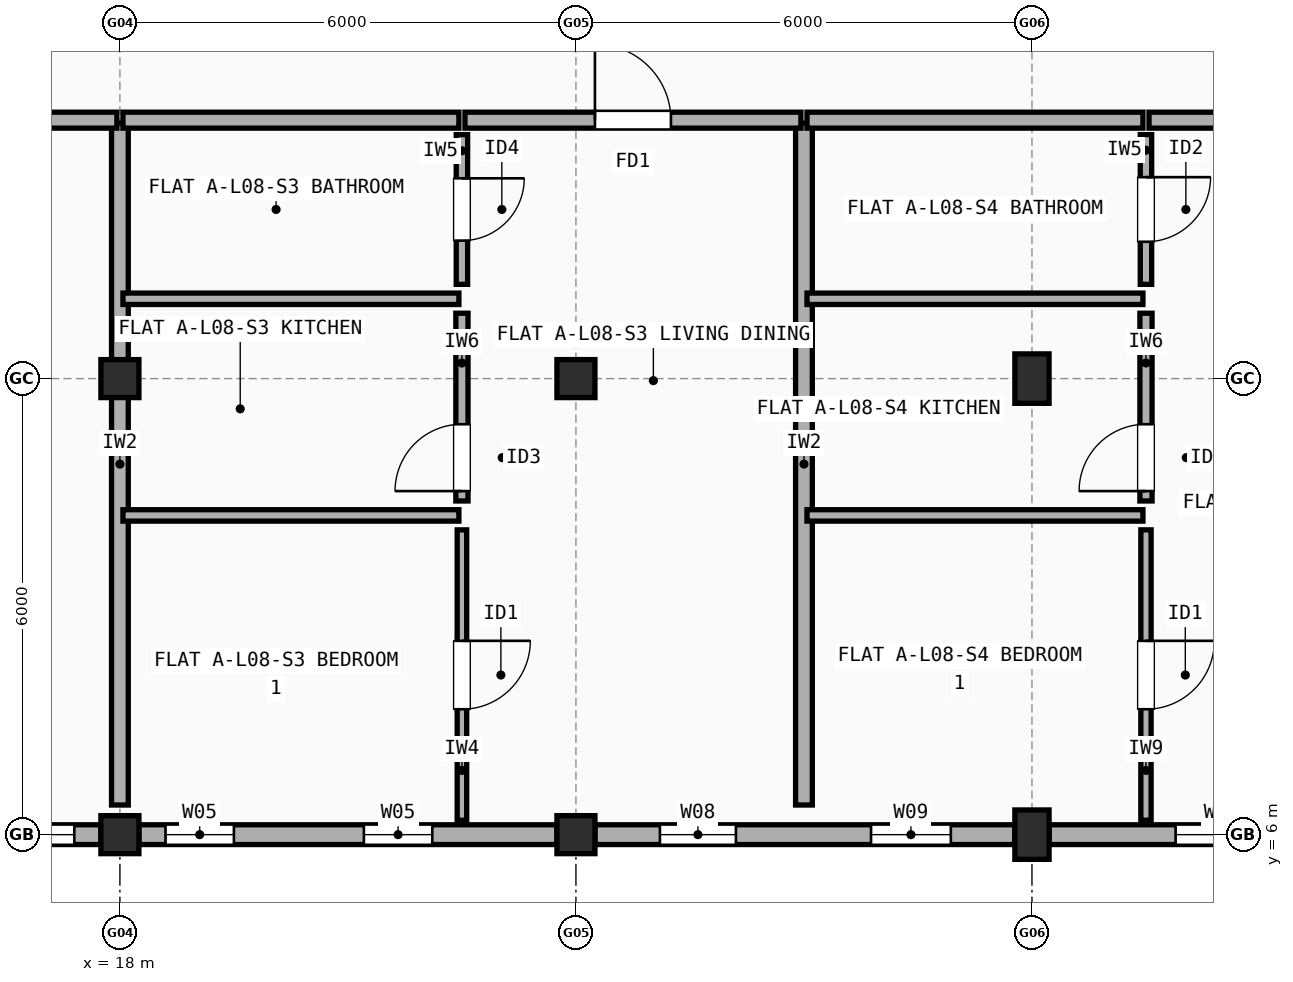
"""IFC4 building model, lengths in metres.
Left out: names, types, materials, properties, quantities, classifications, styles, units other than length and angle.
Written with IfcOpenShell. Run it as: python <this file> out.ifc"""

import sys

from ifc_helpers import new_model, si_unit, direction, frame, frame_2d, origin, origin_2d, place, context, subcontext, project, spatial, rectangle, extrude, element, fill, save


model = new_model("IFC4")
c1 = context("Model", 3, precision=1e-05, world=origin(), true_north=direction((0.0, 1.0)))
c2 = subcontext(c1, "Body", "Model", "MODEL_VIEW")
j1 = project(units=[si_unit("LENGTHUNIT", "METRE"), si_unit("PLANEANGLEUNIT", "RADIAN")], contexts=[c1])
p1 = place(None, origin())
s1 = spatial("IfcSite", under=j1, at=p1, CompositionType="ELEMENT")
p2 = place(p1, origin())
s2 = spatial("IfcBuilding", under=s1, at=p2, CompositionType="ELEMENT")
p3 = place(p2, frame((0.0, 0.0, 26.9)))
s3 = spatial("IfcBuildingStorey", under=s2, at=p3, CompositionType="ELEMENT", Elevation=26.9)
for number, where, z_axis, x_axis in (
    (1, (18.0, 6.0, 0.0), (0.0, 0.0, 1.0), (1.0, 0.0, 0.0)),
    (2, (18.0, 12.0, 0.0), (0.0, 0.0, 1.0), (1.0, 0.0, 0.0)),
    (3, (24.0, 6.0, 0.0), (0.0, 0.0, 1.0), (1.0, 0.0, 0.0)),
    (4, (24.0, 12.0, 0.0), (0.0, 0.0, 1.0), (1.0, 0.0, 0.0)),
):
    element("IfcColumn", number, at=place(p3, frame(where, z_axis=z_axis, x_axis=x_axis)), inside=s3, PredefinedType="COLUMN", context=c2, shape_type="SweptSolid", body=[
        extrude(rectangle(XDim=0.5, YDim=0.5, at=origin_2d()), origin(), (0.0, 0.0, 1.0), 2.98),
    ])
for number, where, z_axis, x_axis in (
    (5, (30.0, 6.0, 0.0), (0.0, 0.0, 1.0), (1.0, 0.0, 0.0)),
    (6, (30.0, 12.0, 0.0), (0.0, 0.0, 1.0), (1.0, 0.0, 0.0)),
):
    element("IfcColumn", number, at=place(p3, frame(where, z_axis=z_axis, x_axis=x_axis)), inside=s3, PredefinedType="COLUMN", context=c2, shape_type="SweptSolid", body=[
        extrude(rectangle(XDim=0.45, YDim=0.65, at=origin_2d()), origin(), (0.0, 0.0, 1.0), 2.98),
    ])
p4 = place(p3, frame((12.25, 6.0, 0.0), z_axis=(0.0, 0.0, 1.0), x_axis=(1.0, 0.0, 0.0)))
e7 = element("IfcWall", 7, at=p4, inside=s3, PredefinedType="STANDARD", context=c2, shape_type="SweptSolid", body=[
    extrude(rectangle(XDim=5.5, YDim=0.26, at=frame_2d((2.75, 0.0))), origin(), (0.0, 0.0, 1.0), 2.462),
])
p5 = place(p4, frame((0.35, 0.0, 0.9)))
e8 = element("IfcOpeningElement", 8, at=p5, cuts=e7, PredefinedType="OPENING", context=c2, shape_type="SweptSolid", body=[
    extrude(rectangle(XDim=1.2, YDim=1.35, at=frame_2d((0.6, 0.675))), frame((0.0, 0.14, 0.0), z_axis=(0.0, -1.0, 0.0), x_axis=(1.0, 0.0, 0.0)), (0.0, 0.0, 1.0), 0.28),
])
p6 = place(p4, frame((3.95, 0.0, 0.9)))
e9 = element("IfcOpeningElement", 9, at=p6, cuts=e7, PredefinedType="OPENING", context=c2, shape_type="SweptSolid", body=[
    extrude(rectangle(XDim=1.2, YDim=1.35, at=frame_2d((0.6, 0.675))), frame((0.0, 0.14, 0.0), z_axis=(0.0, -1.0, 0.0), x_axis=(1.0, 0.0, 0.0)), (0.0, 0.0, 1.0), 0.28),
])
p7 = place(p3, frame((18.25, 6.0, 0.0), z_axis=(0.0, 0.0, 1.0), x_axis=(1.0, 0.0, 0.0)))
e10 = element("IfcWall", 10, at=p7, inside=s3, PredefinedType="STANDARD", context=c2, shape_type="SweptSolid", body=[
    extrude(rectangle(XDim=5.5, YDim=0.26, at=frame_2d((2.75, 0.0))), origin(), (0.0, 0.0, 1.0), 2.462),
])
p8 = place(p7, frame((0.35, 0.0, 0.9)))
e11 = element("IfcOpeningElement", 11, at=p8, cuts=e10, PredefinedType="OPENING", context=c2, shape_type="SweptSolid", body=[
    extrude(rectangle(XDim=0.9, YDim=1.4, at=frame_2d((0.45, 0.7))), frame((0.0, 0.14, 0.0), z_axis=(0.0, -1.0, 0.0), x_axis=(1.0, 0.0, 0.0)), (0.0, 0.0, 1.0), 0.28),
])
p9 = place(p7, frame((2.96, 0.0, 0.9)))
e12 = element("IfcOpeningElement", 12, at=p9, cuts=e10, PredefinedType="OPENING", context=c2, shape_type="SweptSolid", body=[
    extrude(rectangle(XDim=0.9, YDim=1.4, at=frame_2d((0.45, 0.7))), frame((0.0, 0.14, 0.0), z_axis=(0.0, -1.0, 0.0), x_axis=(1.0, 0.0, 0.0)), (0.0, 0.0, 1.0), 0.28),
])
p10 = place(p3, frame((24.25, 6.0, 0.0), z_axis=(0.0, 0.0, 1.0), x_axis=(1.0, 0.0, 0.0)))
e13 = element("IfcWall", 13, at=p10, inside=s3, PredefinedType="STANDARD", context=c2, shape_type="SweptSolid", body=[
    extrude(rectangle(XDim=5.525, YDim=0.26, at=frame_2d((2.762, 0.0))), origin(), (0.0, 0.0, 1.0), 2.462),
])
p11 = place(p10, frame((0.855, 0.0, 0.9)))
e14 = element("IfcOpeningElement", 14, at=p11, cuts=e13, PredefinedType="OPENING", context=c2, shape_type="SweptSolid", body=[
    extrude(rectangle(XDim=1.0, YDim=1.4, at=frame_2d((0.5, 0.7))), frame((0.0, 0.14, 0.0), z_axis=(0.0, -1.0, 0.0), x_axis=(1.0, 0.0, 0.0)), (0.0, 0.0, 1.0), 0.28),
])
p12 = place(p10, frame((3.633, 0.0, 0.9)))
e15 = element("IfcOpeningElement", 15, at=p12, cuts=e13, PredefinedType="OPENING", context=c2, shape_type="SweptSolid", body=[
    extrude(rectangle(XDim=1.05, YDim=1.35, at=frame_2d((0.525, 0.675))), frame((0.0, 0.14, 0.0), z_axis=(0.0, -1.0, 0.0), x_axis=(1.0, 0.0, 0.0)), (0.0, 0.0, 1.0), 0.28),
])
p13 = place(p3, frame((30.225, 6.0, 0.0), z_axis=(0.0, 0.0, 1.0), x_axis=(1.0, 0.0, 0.0)))
e16 = element("IfcWall", 16, at=p13, inside=s3, PredefinedType="STANDARD", context=c2, shape_type="SweptSolid", body=[
    extrude(rectangle(XDim=5.55, YDim=0.26, at=frame_2d((2.775, 0.0))), origin(), (0.0, 0.0, 1.0), 2.462),
])
p14 = place(p13, frame((1.665, 0.0, 0.9)))
e17 = element("IfcOpeningElement", 17, at=p14, cuts=e16, PredefinedType="OPENING", context=c2, shape_type="SweptSolid", body=[
    extrude(rectangle(XDim=1.2, YDim=1.35, at=frame_2d((0.6, 0.675))), frame((0.0, 0.14, 0.0), z_axis=(0.0, -1.0, 0.0), x_axis=(1.0, 0.0, 0.0)), (0.0, 0.0, 1.0), 0.28),
])
p15 = place(p13, frame((4.0, 0.0, 0.9)))
e18 = element("IfcOpeningElement", 18, at=p15, cuts=e16, PredefinedType="OPENING", context=c2, shape_type="SweptSolid", body=[
    extrude(rectangle(XDim=1.2, YDim=1.35, at=frame_2d((0.6, 0.675))), frame((0.0, 0.14, 0.0), z_axis=(0.0, -1.0, 0.0), x_axis=(1.0, 0.0, 0.0)), (0.0, 0.0, 1.0), 0.28),
])
p16 = place(p3, frame((18.0, 6.39, 0.0), z_axis=(0.0, 0.0, 1.0), x_axis=(0.0, 1.0, 0.0)))
e19 = element("IfcWall", 19, at=p16, inside=s3, PredefinedType="SOLIDWALL", context=c2, shape_type="SweptSolid", body=[
    extrude(rectangle(XDim=8.97, YDim=0.22, at=frame_2d((4.485, 0.0))), origin(), (0.0, 0.0, 1.0), 2.508),
])
p17 = place(p3, frame((12.04, 15.4, 0.0), z_axis=(0.0, 0.0, 1.0), x_axis=(1.0, 0.0, 0.0)))
e20 = element("IfcWall", 20, at=p17, inside=s3, PredefinedType="SOLIDWALL", context=c2, shape_type="SweptSolid", body=[
    extrude(rectangle(XDim=5.92, YDim=0.21, at=frame_2d((2.96, 0.0))), origin(), (0.0, 0.0, 1.0), 2.508),
])
p18 = place(p17, frame((2.435, 0.0, 0.0)))
e21 = element("IfcOpeningElement", 21, at=p18, cuts=e20, PredefinedType="OPENING", context=c2, shape_type="SweptSolid", body=[
    extrude(rectangle(XDim=1.05, YDim=2.15, at=frame_2d((0.525, 1.075))), frame((0.0, 0.115, 0.0), z_axis=(0.0, -1.0, 0.0), x_axis=(1.0, 0.0, 0.0)), (0.0, 0.0, 1.0), 0.23),
])
p19 = place(p3, frame((27.0, 6.39, 0.0), z_axis=(0.0, 0.0, 1.0), x_axis=(0.0, 1.0, 0.0)))
e22 = element("IfcWall", 22, at=p19, inside=s3, PredefinedType="SOLIDWALL", context=c2, shape_type="SweptSolid", body=[
    extrude(rectangle(XDim=8.97, YDim=0.22, at=frame_2d((4.485, 0.0))), origin(), (0.0, 0.0, 1.0), 2.408),
])
p20 = place(p3, frame((18.04, 15.4, 0.0), z_axis=(0.0, 0.0, 1.0), x_axis=(1.0, 0.0, 0.0)))
e23 = element("IfcWall", 23, at=p20, inside=s3, PredefinedType="SOLIDWALL", context=c2, shape_type="SweptSolid", body=[
    extrude(rectangle(XDim=4.42, YDim=0.21, at=frame_2d((2.21, 0.0))), origin(), (0.0, 0.0, 1.0), 2.508),
])
p21 = place(p3, frame((22.54, 15.4, 0.0), z_axis=(0.0, 0.0, 1.0), x_axis=(1.0, 0.0, 0.0)))
e24 = element("IfcWall", 24, at=p21, inside=s3, PredefinedType="SOLIDWALL", context=c2, shape_type="SweptSolid", body=[
    extrude(rectangle(XDim=4.42, YDim=0.21, at=frame_2d((2.21, 0.0))), origin(), (0.0, 0.0, 1.0), 2.508),
])
p22 = place(p21, frame((1.71, 0.0, 0.0)))
e25 = element("IfcOpeningElement", 25, at=p22, cuts=e24, PredefinedType="OPENING", context=c2, shape_type="SweptSolid", body=[
    extrude(rectangle(XDim=1.0, YDim=2.15, at=frame_2d((0.5, 1.075))), frame((0.0, 0.115, 0.0), z_axis=(0.0, -1.0, 0.0), x_axis=(1.0, 0.0, 0.0)), (0.0, 0.0, 1.0), 0.23),
])
p23 = place(p3, frame((22.5, 6.19, 0.0), z_axis=(0.0, 0.0, 1.0), x_axis=(0.0, 1.0, 0.0)))
e26 = element("IfcWall", 26, at=p23, inside=s3, PredefinedType="PARTITIONING", context=c2, shape_type="SweptSolid", body=[
    extrude(rectangle(XDim=3.82, YDim=0.125, at=frame_2d((1.91, 0.0))), origin(), (0.0, 0.0, 1.0), 2.98),
])
p24 = place(p23, frame((1.46, 0.0, 0.0)))
e27 = element("IfcOpeningElement", 27, at=p24, cuts=e26, PredefinedType="OPENING", context=c2, shape_type="SweptSolid", body=[
    extrude(rectangle(XDim=0.9, YDim=2.1, at=frame_2d((0.45, 1.05))), frame((0.0, 0.073, 0.0), z_axis=(0.0, -1.0, 0.0), x_axis=(1.0, 0.0, 0.0)), (0.0, 0.0, 1.0), 0.145),
])
p25 = place(p3, frame((22.5, 10.39, 0.0), z_axis=(0.0, 0.0, 1.0), x_axis=(0.0, 1.0, 0.0)))
e28 = element("IfcWall", 28, at=p25, inside=s3, PredefinedType="PLUMBINGWALL", context=c2, shape_type="SweptSolid", body=[
    extrude(rectangle(XDim=2.47, YDim=0.16, at=frame_2d((1.235, 0.0))), origin(), (0.0, 0.0, 1.0), 2.508),
])
p26 = place(p25, frame((0.13, 0.0, 0.0)))
e29 = element("IfcOpeningElement", 29, at=p26, cuts=e28, PredefinedType="OPENING", context=c2, shape_type="SweptSolid", body=[
    extrude(rectangle(XDim=0.88, YDim=2.1, at=frame_2d((0.44, 1.05))), frame((0.0, 0.09, 0.0), z_axis=(0.0, -1.0, 0.0), x_axis=(1.0, 0.0, 0.0)), (0.0, 0.0, 1.0), 0.18),
])
p27 = place(p3, frame((22.5, 13.24, 0.0), z_axis=(0.0, 0.0, 1.0), x_axis=(0.0, 1.0, 0.0)))
e30 = element("IfcWall", 30, at=p27, inside=s3, PredefinedType="PARTITIONING", context=c2, shape_type="SweptSolid", body=[
    extrude(rectangle(XDim=1.97, YDim=0.15, at=frame_2d((0.985, 0.0))), origin(), (0.0, 0.0, 1.0), 2.98),
])
p28 = place(p27, frame((0.575, 0.0, 0.0)))
e31 = element("IfcOpeningElement", 31, at=p28, cuts=e30, PredefinedType="OPENING", context=c2, shape_type="SweptSolid", body=[
    extrude(rectangle(XDim=0.82, YDim=2.08, at=frame_2d((0.41, 1.04))), frame((0.0, 0.085, 0.0), z_axis=(0.0, -1.0, 0.0), x_axis=(1.0, 0.0, 0.0)), (0.0, 0.0, 1.0), 0.17),
])
p29 = place(p3, frame((18.04, 10.2, 0.0), z_axis=(0.0, 0.0, 1.0), x_axis=(1.0, 0.0, 0.0)))
e32 = element("IfcWall", 32, at=p29, inside=s3, PredefinedType="PARTITIONING", context=c2, shape_type="SweptSolid", body=[
    extrude(rectangle(XDim=4.42, YDim=0.15, at=frame_2d((2.21, 0.0))), origin(), (0.0, 0.0, 1.0), 2.548),
])
p30 = place(p3, frame((18.04, 13.05, 0.0), z_axis=(0.0, 0.0, 1.0), x_axis=(1.0, 0.0, 0.0)))
e33 = element("IfcWall", 33, at=p30, inside=s3, PredefinedType="PARTITIONING", context=c2, shape_type="SweptSolid", body=[
    extrude(rectangle(XDim=4.42, YDim=0.15, at=frame_2d((2.21, 0.0))), origin(), (0.0, 0.0, 1.0), 2.508),
])
p31 = place(p3, frame((27.04, 15.4, 0.0), z_axis=(0.0, 0.0, 1.0), x_axis=(1.0, 0.0, 0.0)))
e34 = element("IfcWall", 34, at=p31, inside=s3, PredefinedType="SOLIDWALL", context=c2, shape_type="SweptSolid", body=[
    extrude(rectangle(XDim=4.42, YDim=0.21, at=frame_2d((2.21, 0.0))), origin(), (0.0, 0.0, 1.0), 2.462),
])
p32 = place(p3, frame((31.54, 15.4, 0.0), z_axis=(0.0, 0.0, 1.0), x_axis=(1.0, 0.0, 0.0)))
e35 = element("IfcWall", 35, at=p32, inside=s3, PredefinedType="SOLIDWALL", context=c2, shape_type="SweptSolid", body=[
    extrude(rectangle(XDim=4.42, YDim=0.21, at=frame_2d((2.21, 0.0))), origin(), (0.0, 0.0, 1.0), 2.462),
])
p33 = place(p32, frame((1.72, 0.0, 0.0)))
e36 = element("IfcOpeningElement", 36, at=p33, cuts=e35, PredefinedType="OPENING", context=c2, shape_type="SweptSolid", body=[
    extrude(rectangle(XDim=0.98, YDim=2.15, at=frame_2d((0.49, 1.075))), frame((0.0, 0.115, 0.0), z_axis=(0.0, -1.0, 0.0), x_axis=(1.0, 0.0, 0.0)), (0.0, 0.0, 1.0), 0.23),
])
p34 = place(p3, frame((31.5, 6.19, 0.0), z_axis=(0.0, 0.0, 1.0), x_axis=(0.0, 1.0, 0.0)))
e37 = element("IfcWall", 37, at=p34, inside=s3, PredefinedType="PARTITIONING", context=c2, shape_type="SweptSolid", body=[
    extrude(rectangle(XDim=3.82, YDim=0.135, at=frame_2d((1.91, 0.0))), origin(), (0.0, 0.0, 1.0), 2.98),
])
p35 = place(p34, frame((1.46, 0.0, 0.0)))
e38 = element("IfcOpeningElement", 38, at=p35, cuts=e37, PredefinedType="OPENING", context=c2, shape_type="SweptSolid", body=[
    extrude(rectangle(XDim=0.9, YDim=2.1, at=frame_2d((0.45, 1.05))), frame((0.0, 0.077, 0.0), z_axis=(0.0, -1.0, 0.0), x_axis=(1.0, 0.0, 0.0)), (0.0, 0.0, 1.0), 0.155),
])
p36 = place(p3, frame((31.5, 10.39, 0.0), z_axis=(0.0, 0.0, 1.0), x_axis=(0.0, 1.0, 0.0)))
e39 = element("IfcWall", 39, at=p36, inside=s3, PredefinedType="PLUMBINGWALL", context=c2, shape_type="SweptSolid", body=[
    extrude(rectangle(XDim=2.47, YDim=0.16, at=frame_2d((1.235, 0.0))), origin(), (0.0, 0.0, 1.0), 2.548),
])
p37 = place(p36, frame((0.13, 0.0, 0.0)))
e40 = element("IfcOpeningElement", 40, at=p37, cuts=e39, PredefinedType="OPENING", context=c2, shape_type="SweptSolid", body=[
    extrude(rectangle(XDim=0.88, YDim=2.1, at=frame_2d((0.44, 1.05))), frame((0.0, 0.09, 0.0), z_axis=(0.0, -1.0, 0.0), x_axis=(1.0, 0.0, 0.0)), (0.0, 0.0, 1.0), 0.18),
])
p38 = place(p3, frame((31.5, 13.24, 0.0), z_axis=(0.0, 0.0, 1.0), x_axis=(0.0, 1.0, 0.0)))
e41 = element("IfcWall", 41, at=p38, inside=s3, PredefinedType="PARTITIONING", context=c2, shape_type="SweptSolid", body=[
    extrude(rectangle(XDim=1.97, YDim=0.15, at=frame_2d((0.985, 0.0))), origin(), (0.0, 0.0, 1.0), 2.98),
])
p39 = place(p38, frame((0.56, 0.0, 0.0)))
e42 = element("IfcOpeningElement", 42, at=p39, cuts=e41, PredefinedType="OPENING", context=c2, shape_type="SweptSolid", body=[
    extrude(rectangle(XDim=0.85, YDim=2.1, at=frame_2d((0.425, 1.05))), frame((0.0, 0.085, 0.0), z_axis=(0.0, -1.0, 0.0), x_axis=(1.0, 0.0, 0.0)), (0.0, 0.0, 1.0), 0.17),
])
for number, where, z_axis, x_axis in (
    (43, (27.04, 10.2, 0.0), (0.0, 0.0, 1.0), (1.0, 0.0, 0.0)),
    (44, (27.04, 13.05, 0.0), (0.0, 0.0, 1.0), (1.0, 0.0, 0.0)),
):
    element("IfcWall", number, at=place(p3, frame(where, z_axis=z_axis, x_axis=x_axis)), inside=s3, PredefinedType="PARTITIONING", context=c2, shape_type="SweptSolid", body=[
        extrude(rectangle(XDim=4.42, YDim=0.15, at=frame_2d((2.21, 0.0))), origin(), (0.0, 0.0, 1.0), 2.462),
    ])
p40 = place(p6, origin())
e45 = element("IfcWindow", 45, at=p40, inside=s3, PartitioningType="SINGLE_PANEL", PredefinedType="WINDOW", context=c2, shape_type="SweptSolid", body=[
    extrude(rectangle(XDim=1.2, YDim=1.35, at=frame_2d((0.6, 0.675))), frame((0.0, 0.03, 0.0), z_axis=(0.0, -1.0, 0.0), x_axis=(1.0, 0.0, 0.0)), (0.0, 0.0, 1.0), 0.06),
])
fill(e9, e45)
p41 = place(p8, origin())
e46 = element("IfcWindow", 46, at=p41, inside=s3, PartitioningType="SINGLE_PANEL", PredefinedType="WINDOW", context=c2, shape_type="SweptSolid", body=[
    extrude(rectangle(XDim=0.9, YDim=1.4, at=frame_2d((0.45, 0.7))), frame((0.0, 0.03, 0.0), z_axis=(0.0, -1.0, 0.0), x_axis=(1.0, 0.0, 0.0)), (0.0, 0.0, 1.0), 0.06),
])
fill(e11, e46)
p42 = place(p9, origin())
e47 = element("IfcWindow", 47, at=p42, inside=s3, PartitioningType="SINGLE_PANEL", PredefinedType="WINDOW", context=c2, shape_type="SweptSolid", body=[
    extrude(rectangle(XDim=0.9, YDim=1.4, at=frame_2d((0.45, 0.7))), frame((0.0, 0.03, 0.0), z_axis=(0.0, -1.0, 0.0), x_axis=(1.0, 0.0, 0.0)), (0.0, 0.0, 1.0), 0.06),
])
fill(e12, e47)
p43 = place(p11, origin())
e48 = element("IfcWindow", 48, at=p43, inside=s3, PartitioningType="SINGLE_PANEL", PredefinedType="WINDOW", context=c2, shape_type="SweptSolid", body=[
    extrude(rectangle(XDim=1.0, YDim=1.4, at=frame_2d((0.5, 0.7))), frame((0.0, 0.03, 0.0), z_axis=(0.0, -1.0, 0.0), x_axis=(1.0, 0.0, 0.0)), (0.0, 0.0, 1.0), 0.06),
])
fill(e14, e48)
p44 = place(p12, origin())
e49 = element("IfcWindow", 49, at=p44, inside=s3, PartitioningType="SINGLE_PANEL", PredefinedType="WINDOW", context=c2, shape_type="SweptSolid", body=[
    extrude(rectangle(XDim=1.05, YDim=1.35, at=frame_2d((0.525, 0.675))), frame((0.0, 0.03, 0.0), z_axis=(0.0, -1.0, 0.0), x_axis=(1.0, 0.0, 0.0)), (0.0, 0.0, 1.0), 0.06),
])
fill(e15, e49)
p45 = place(p14, origin())
e50 = element("IfcWindow", 50, at=p45, inside=s3, PartitioningType="SINGLE_PANEL", PredefinedType="WINDOW", context=c2, shape_type="SweptSolid", body=[
    extrude(rectangle(XDim=1.2, YDim=1.35, at=frame_2d((0.6, 0.675))), frame((0.0, 0.03, 0.0), z_axis=(0.0, -1.0, 0.0), x_axis=(1.0, 0.0, 0.0)), (0.0, 0.0, 1.0), 0.06),
])
fill(e17, e50)
p46 = place(p22, origin())
e51 = element("IfcDoor", 51, at=p46, inside=s3, OperationType="SINGLE_SWING_LEFT", PredefinedType="DOOR", context=c2, shape_type="SweptSolid", body=[
    extrude(rectangle(XDim=1.0, YDim=2.15, at=frame_2d((0.5, 1.075))), frame((0.0, 0.025, 0.0), z_axis=(0.0, -1.0, 0.0), x_axis=(1.0, 0.0, 0.0)), (0.0, 0.0, 1.0), 0.05),
])
fill(e25, e51)
p47 = place(p24, origin())
e52 = element("IfcDoor", 52, at=p47, inside=s3, OperationType="SINGLE_SWING_RIGHT", PredefinedType="DOOR", context=c2, shape_type="SweptSolid", body=[
    extrude(rectangle(XDim=0.9, YDim=2.1, at=frame_2d((0.45, 1.05))), frame((0.0, 0.025, 0.0), z_axis=(0.0, -1.0, 0.0), x_axis=(1.0, 0.0, 0.0)), (0.0, 0.0, 1.0), 0.05),
])
fill(e27, e52)
p48 = place(p26, origin())
e53 = element("IfcDoor", 53, at=p48, inside=s3, OperationType="SINGLE_SWING_LEFT", PredefinedType="DOOR", context=c2, shape_type="SweptSolid", body=[
    extrude(rectangle(XDim=0.88, YDim=2.1, at=frame_2d((0.44, 1.05))), frame((0.0, 0.025, 0.0), z_axis=(0.0, -1.0, 0.0), x_axis=(1.0, 0.0, 0.0)), (0.0, 0.0, 1.0), 0.05),
])
fill(e29, e53)
p49 = place(p28, origin())
e54 = element("IfcDoor", 54, at=p49, inside=s3, OperationType="SINGLE_SWING_RIGHT", PredefinedType="DOOR", context=c2, shape_type="SweptSolid", body=[
    extrude(rectangle(XDim=0.82, YDim=2.08, at=frame_2d((0.41, 1.04))), frame((0.0, 0.025, 0.0), z_axis=(0.0, -1.0, 0.0), x_axis=(1.0, 0.0, 0.0)), (0.0, 0.0, 1.0), 0.05),
])
fill(e31, e54)
p50 = place(p35, origin())
e55 = element("IfcDoor", 55, at=p50, inside=s3, OperationType="SINGLE_SWING_RIGHT", PredefinedType="DOOR", context=c2, shape_type="SweptSolid", body=[
    extrude(rectangle(XDim=0.9, YDim=2.1, at=frame_2d((0.45, 1.05))), frame((0.0, 0.025, 0.0), z_axis=(0.0, -1.0, 0.0), x_axis=(1.0, 0.0, 0.0)), (0.0, 0.0, 1.0), 0.05),
])
fill(e38, e55)
p51 = place(p37, origin())
e56 = element("IfcDoor", 56, at=p51, inside=s3, OperationType="SINGLE_SWING_LEFT", PredefinedType="DOOR", context=c2, shape_type="SweptSolid", body=[
    extrude(rectangle(XDim=0.88, YDim=2.1, at=frame_2d((0.44, 1.05))), frame((0.0, 0.025, 0.0), z_axis=(0.0, -1.0, 0.0), x_axis=(1.0, 0.0, 0.0)), (0.0, 0.0, 1.0), 0.05),
])
fill(e40, e56)
p52 = place(p39, origin())
e57 = element("IfcDoor", 57, at=p52, inside=s3, OperationType="SINGLE_SWING_RIGHT", PredefinedType="DOOR", context=c2, shape_type="SweptSolid", body=[
    extrude(rectangle(XDim=0.85, YDim=2.1, at=frame_2d((0.425, 1.05))), frame((0.0, 0.025, 0.0), z_axis=(0.0, -1.0, 0.0), x_axis=(1.0, 0.0, 0.0)), (0.0, 0.0, 1.0), 0.05),
])
fill(e42, e57)
save(model, sys.argv[1])
